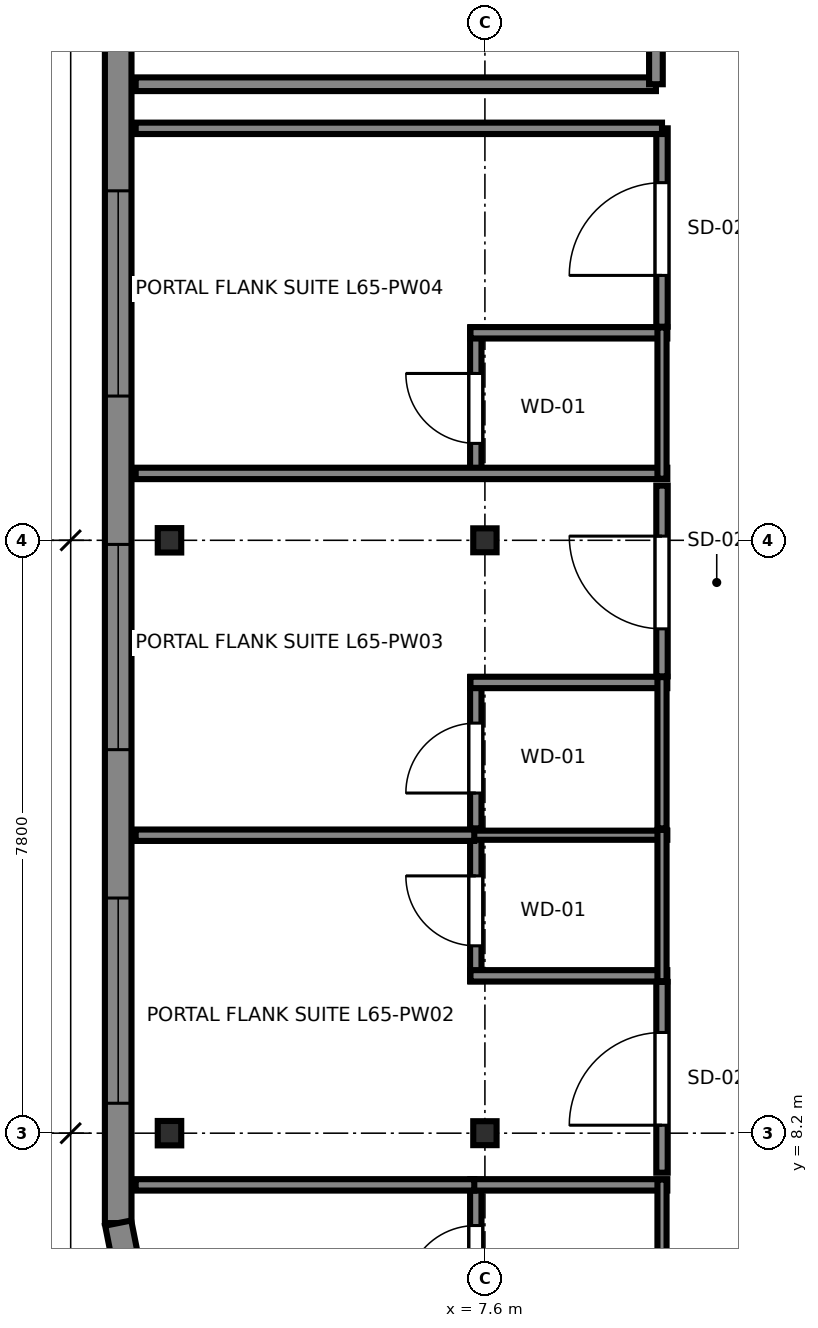
"""IFC4 building model, lengths in metres.
Left out: names, types, materials, properties, quantities, classifications, styles, units other than length and angle.
Written with IfcOpenShell. Run it as: python <this file> out.ifc"""

import sys

from ifc_helpers import new_model, si_unit, direction, frame, frame_2d, origin, origin_2d, place, context, subcontext, project, spatial, rectangle, i_section, extrude, source, transform, mapped, element, fill, save


model = new_model("IFC4")
c1 = context("Model", 3, precision=1e-05, world=origin(), true_north=direction((0.0, 1.0)))
c2 = subcontext(c1, "Body", "Model", "MODEL_VIEW")
j1 = project(units=[si_unit("LENGTHUNIT", "METRE"), si_unit("PLANEANGLEUNIT", "RADIAN")], contexts=[c1])
p1 = place(None, origin())
s1 = spatial("IfcSite", under=j1, at=p1, CompositionType="ELEMENT")
p2 = place(p1, origin())
s2 = spatial("IfcBuilding", under=s1, at=p2, CompositionType="ELEMENT")
p3 = place(p2, frame((0.0, 0.0, 245.2)))
s3 = spatial("IfcBuildingStorey", under=s2, at=p3, CompositionType="ELEMENT", Elevation=245.2)
m1 = source(origin(), c2, "Body", "SweptSolid", [
    extrude(i_section(OverallWidth=0.309, OverallDepth=0.321, WebThickness=0.014, FlangeThickness=0.022, FilletRadius=0.017, at=origin_2d()), origin(), (0.0, 0.0, 1.0), 3.55),
])
for number, where, z_axis, x_axis in (
    (1, (3.45, 8.2, 0.0), (0.0, 0.0, 1.0), (1.0, 0.0, 0.0)),
    (2, (3.45, 16.0, 0.0), (0.0, 0.0, 1.0), (1.0, 0.0, 0.0)),
):
    element("IfcColumn", number, at=place(p3, frame(where, z_axis=z_axis, x_axis=x_axis)), inside=s3, PredefinedType="COLUMN", context=c2, shape_type="MappedRepresentation", body=[
        mapped(m1, transform((0.0, 0.0, 0.0), x_axis=(1.0, 0.0, 0.0), y_axis=(0.0, 1.0, 0.0), z_axis=(0.0, 0.0, 1.0), scale=1.0)),
    ])
m2 = source(origin(), c2, "Body", "SweptSolid", [
    extrude(i_section(OverallWidth=0.307, OverallDepth=0.315, WebThickness=0.012, FlangeThickness=0.019, FilletRadius=0.017, at=origin_2d()), origin(), (0.0, 0.0, 1.0), 3.55),
])
for number, where, z_axis, x_axis in (
    (3, (7.6, 8.2, 0.0), (0.0, 0.0, 1.0), (1.0, 0.0, 0.0)),
    (4, (7.6, 16.0, 0.0), (0.0, 0.0, 1.0), (1.0, 0.0, 0.0)),
):
    element("IfcColumn", number, at=place(p3, frame(where, z_axis=z_axis, x_axis=x_axis)), inside=s3, PredefinedType="COLUMN", context=c2, shape_type="MappedRepresentation", body=[
        mapped(m2, transform((0.0, 0.0, 0.0), x_axis=(1.0, 0.0, 0.0), y_axis=(0.0, 1.0, 0.0), z_axis=(0.0, 0.0, 1.0), scale=1.0)),
    ])
p4 = place(p3, frame((2.775, 40.783, 0.0), z_axis=(0.0, 0.0, 1.0), x_axis=(0.0, -1.0, 0.0)))
e5 = element("IfcWall", 5, at=p4, inside=s3, PredefinedType="SOLIDWALL", context=c2, shape_type="SweptSolid", body=[
    extrude(rectangle(XDim=33.766, YDim=0.35, at=frame_2d((16.883, 0.0))), origin(), (0.0, 0.0, 1.0), 3.37),
])
p5 = place(p4, frame((1.576, 0.0, 0.68)))
e6 = element("IfcOpeningElement", 6, at=p5, cuts=e5, PredefinedType="OPENING", context=c2, shape_type="SweptSolid", body=[
    extrude(rectangle(XDim=2.7, YDim=1.95, at=frame_2d((1.35, 0.975))), frame((0.0, 0.185, 0.0), z_axis=(0.0, -1.0, 0.0), x_axis=(1.0, 0.0, 0.0)), (0.0, 0.0, 1.0), 0.37),
])
p6 = place(p4, frame((6.228, 0.0, 0.68)))
e7 = element("IfcOpeningElement", 7, at=p6, cuts=e5, PredefinedType="OPENING", context=c2, shape_type="SweptSolid", body=[
    extrude(rectangle(XDim=2.7, YDim=1.95, at=frame_2d((1.35, 0.975))), frame((0.0, 0.185, 0.0), z_axis=(0.0, -1.0, 0.0), x_axis=(1.0, 0.0, 0.0)), (0.0, 0.0, 1.0), 0.37),
])
p7 = place(p4, frame((11.431, 0.0, 0.68)))
e8 = element("IfcOpeningElement", 8, at=p7, cuts=e5, PredefinedType="OPENING", context=c2, shape_type="SweptSolid", body=[
    extrude(rectangle(XDim=2.7, YDim=1.95, at=frame_2d((1.35, 0.975))), frame((0.0, 0.185, 0.0), z_axis=(0.0, -1.0, 0.0), x_axis=(1.0, 0.0, 0.0)), (0.0, 0.0, 1.0), 0.37),
])
p8 = place(p4, frame((15.533, 0.0, 0.68)))
e9 = element("IfcOpeningElement", 9, at=p8, cuts=e5, PredefinedType="OPENING", context=c2, shape_type="SweptSolid", body=[
    extrude(rectangle(XDim=2.7, YDim=1.95, at=frame_2d((1.35, 0.975))), frame((0.0, 0.185, 0.0), z_axis=(0.0, -1.0, 0.0), x_axis=(1.0, 0.0, 0.0)), (0.0, 0.0, 1.0), 0.37),
])
p9 = place(p4, frame((20.185, 0.0, 0.68)))
e10 = element("IfcOpeningElement", 10, at=p9, cuts=e5, PredefinedType="OPENING", context=c2, shape_type="SweptSolid", body=[
    extrude(rectangle(XDim=2.7, YDim=1.95, at=frame_2d((1.35, 0.975))), frame((0.0, 0.185, 0.0), z_axis=(0.0, -1.0, 0.0), x_axis=(1.0, 0.0, 0.0)), (0.0, 0.0, 1.0), 0.37),
])
p10 = place(p4, frame((24.837, 0.0, 0.68)))
e11 = element("IfcOpeningElement", 11, at=p10, cuts=e5, PredefinedType="OPENING", context=c2, shape_type="SweptSolid", body=[
    extrude(rectangle(XDim=2.7, YDim=1.95, at=frame_2d((1.35, 0.975))), frame((0.0, 0.185, 0.0), z_axis=(0.0, -1.0, 0.0), x_axis=(1.0, 0.0, 0.0)), (0.0, 0.0, 1.0), 0.37),
])
p11 = place(p4, frame((29.489, 0.0, 0.68)))
e12 = element("IfcOpeningElement", 12, at=p11, cuts=e5, PredefinedType="OPENING", context=c2, shape_type="SweptSolid", body=[
    extrude(rectangle(XDim=2.7, YDim=1.95, at=frame_2d((1.35, 0.975))), frame((0.0, 0.185, 0.0), z_axis=(0.0, -1.0, 0.0), x_axis=(1.0, 0.0, 0.0)), (0.0, 0.0, 1.0), 0.37),
])
p12 = place(p3, frame((2.775, 7.017, 0.0), z_axis=(0.0, 0.0, 1.0), x_axis=(0.195072403631, -0.980788844421, 0.0)))
e13 = element("IfcWall", 13, at=p12, inside=s3, PredefinedType="SOLIDWALL", context=c2, shape_type="SweptSolid", body=[
    extrude(rectangle(XDim=1.665, YDim=0.35, at=frame_2d((0.832, 0.0))), origin(), (0.0, 0.0, 1.0), 3.37),
])
p13 = place(p3, frame((7.48, 5.6, 0.0), z_axis=(0.0, 0.0, 1.0), x_axis=(0.0, 1.0, 0.0)))
e14 = element("IfcWall", 14, at=p13, inside=s3, PredefinedType="PARTITIONING", context=c2, shape_type="SweptSolid", body=[
    extrude(rectangle(XDim=1.99, YDim=0.15, at=frame_2d((0.995, 0.0))), origin(), (0.0, 0.0, 1.0), 2.827),
])
p14 = place(p13, frame((0.465, 0.0, 0.0)))
e15 = element("IfcOpeningElement", 15, at=p14, cuts=e14, PredefinedType="OPENING", context=c2, shape_type="SweptSolid", body=[
    extrude(rectangle(XDim=0.92, YDim=2.01, at=frame_2d((0.46, 1.005))), frame((0.0, 0.085, 0.0), z_axis=(0.0, -1.0, 0.0), x_axis=(1.0, 0.0, 0.0)), (0.0, 0.0, 1.0), 0.17),
])
p15 = place(p3, frame((7.41, 7.52, 0.0), z_axis=(0.0, 0.0, 1.0), x_axis=(1.0, 0.0, 0.0)))
e16 = element("IfcWall", 16, at=p15, inside=s3, PredefinedType="PARTITIONING", context=c2, shape_type="SweptSolid", body=[
    extrude(rectangle(XDim=2.59, YDim=0.15, at=frame_2d((1.295, 0.0))), origin(), (0.0, 0.0, 1.0), 3.37),
])
p16 = place(p3, frame((9.93, 5.6, 0.0), z_axis=(0.0, 0.0, 1.0), x_axis=(0.0, 1.0, 0.0)))
e17 = element("IfcWall", 17, at=p16, inside=s3, PredefinedType="PLUMBINGWALL", context=c2, shape_type="SweptSolid", body=[
    extrude(rectangle(XDim=1.99, YDim=0.12, at=frame_2d((0.995, 0.0))), origin(), (0.0, 0.0, 1.0), 3.37),
])
p17 = place(p3, frame((7.48, 10.2, 0.0), z_axis=(0.0, 0.0, 1.0), x_axis=(0.0, 1.0, 0.0)))
e18 = element("IfcWall", 18, at=p17, inside=s3, PredefinedType="PARTITIONING", context=c2, shape_type="SweptSolid", body=[
    extrude(rectangle(XDim=1.99, YDim=0.15, at=frame_2d((0.995, 0.0))), origin(), (0.0, 0.0, 1.0), 2.827),
])
p18 = place(p17, frame((0.465, 0.0, 0.0)))
e19 = element("IfcOpeningElement", 19, at=p18, cuts=e18, PredefinedType="OPENING", context=c2, shape_type="SweptSolid", body=[
    extrude(rectangle(XDim=0.92, YDim=2.01, at=frame_2d((0.46, 1.005))), frame((0.0, 0.085, 0.0), z_axis=(0.0, -1.0, 0.0), x_axis=(1.0, 0.0, 0.0)), (0.0, 0.0, 1.0), 0.17),
])
p19 = place(p3, frame((7.41, 10.27, 0.0), z_axis=(0.0, 0.0, 1.0), x_axis=(1.0, 0.0, 0.0)))
e20 = element("IfcWall", 20, at=p19, inside=s3, PredefinedType="PARTITIONING", context=c2, shape_type="SweptSolid", body=[
    extrude(rectangle(XDim=2.59, YDim=0.15, at=frame_2d((1.295, 0.0))), origin(), (0.0, 0.0, 1.0), 3.37),
])
p20 = place(p3, frame((7.41, 12.12, 0.0), z_axis=(0.0, 0.0, 1.0), x_axis=(1.0, 0.0, 0.0)))
e21 = element("IfcWall", 21, at=p20, inside=s3, PredefinedType="PLUMBINGWALL", context=c2, shape_type="SweptSolid", body=[
    extrude(rectangle(XDim=2.59, YDim=0.12, at=frame_2d((1.295, 0.0))), origin(), (0.0, 0.0, 1.0), 3.37),
])
p21 = place(p3, frame((9.93, 10.2, 0.0), z_axis=(0.0, 0.0, 1.0), x_axis=(0.0, 1.0, 0.0)))
e22 = element("IfcWall", 22, at=p21, inside=s3, PredefinedType="PLUMBINGWALL", context=c2, shape_type="SweptSolid", body=[
    extrude(rectangle(XDim=1.99, YDim=0.12, at=frame_2d((0.995, 0.0))), origin(), (0.0, 0.0, 1.0), 3.37),
])
p22 = place(p3, frame((7.48, 12.21, 0.0), z_axis=(0.0, 0.0, 1.0), x_axis=(0.0, 1.0, 0.0)))
e23 = element("IfcWall", 23, at=p22, inside=s3, PredefinedType="PARTITIONING", context=c2, shape_type="SweptSolid", body=[
    extrude(rectangle(XDim=1.99, YDim=0.15, at=frame_2d((0.995, 0.0))), origin(), (0.0, 0.0, 1.0), 2.827),
])
p23 = place(p22, frame((0.465, 0.0, 0.0)))
e24 = element("IfcOpeningElement", 24, at=p23, cuts=e23, PredefinedType="OPENING", context=c2, shape_type="SweptSolid", body=[
    extrude(rectangle(XDim=0.92, YDim=2.01, at=frame_2d((0.46, 1.005))), frame((0.0, 0.085, 0.0), z_axis=(0.0, -1.0, 0.0), x_axis=(1.0, 0.0, 0.0)), (0.0, 0.0, 1.0), 0.17),
])
p24 = place(p3, frame((7.41, 14.13, 0.0), z_axis=(0.0, 0.0, 1.0), x_axis=(1.0, 0.0, 0.0)))
e25 = element("IfcWall", 25, at=p24, inside=s3, PredefinedType="PARTITIONING", context=c2, shape_type="SweptSolid", body=[
    extrude(rectangle(XDim=2.59, YDim=0.15, at=frame_2d((1.295, 0.0))), origin(), (0.0, 0.0, 1.0), 3.37),
])
p25 = place(p3, frame((9.93, 12.21, 0.0), z_axis=(0.0, 0.0, 1.0), x_axis=(0.0, 1.0, 0.0)))
e26 = element("IfcWall", 26, at=p25, inside=s3, PredefinedType="PLUMBINGWALL", context=c2, shape_type="SweptSolid", body=[
    extrude(rectangle(XDim=1.99, YDim=0.12, at=frame_2d((0.995, 0.0))), origin(), (0.0, 0.0, 1.0), 3.37),
])
p26 = place(p3, frame((7.48, 16.81, 0.0), z_axis=(0.0, 0.0, 1.0), x_axis=(0.0, 1.0, 0.0)))
e27 = element("IfcWall", 27, at=p26, inside=s3, PredefinedType="PARTITIONING", context=c2, shape_type="SweptSolid", body=[
    extrude(rectangle(XDim=1.99, YDim=0.15, at=frame_2d((0.995, 0.0))), origin(), (0.0, 0.0, 1.0), 2.827),
])
p27 = place(p26, frame((0.465, 0.0, 0.0)))
e28 = element("IfcOpeningElement", 28, at=p27, cuts=e27, PredefinedType="OPENING", context=c2, shape_type="SweptSolid", body=[
    extrude(rectangle(XDim=0.92, YDim=2.01, at=frame_2d((0.46, 1.005))), frame((0.0, 0.085, 0.0), z_axis=(0.0, -1.0, 0.0), x_axis=(1.0, 0.0, 0.0)), (0.0, 0.0, 1.0), 0.17),
])
p28 = place(p3, frame((3.005, 16.88, 0.0), z_axis=(0.0, 0.0, 1.0), x_axis=(1.0, 0.0, 0.0)))
e29 = element("IfcWall", 29, at=p28, inside=s3, PredefinedType="PARTITIONING", context=c2, shape_type="SweptSolid", body=[
    extrude(rectangle(XDim=6.995, YDim=0.15, at=frame_2d((3.498, 0.0))), origin(), (0.0, 0.0, 1.0), 3.37),
])
p29 = place(p3, frame((7.41, 18.73, 0.0), z_axis=(0.0, 0.0, 1.0), x_axis=(1.0, 0.0, 0.0)))
e30 = element("IfcWall", 30, at=p29, inside=s3, PredefinedType="PARTITIONING", context=c2, shape_type="SweptSolid", body=[
    extrude(rectangle(XDim=2.59, YDim=0.15, at=frame_2d((1.295, 0.0))), origin(), (0.0, 0.0, 1.0), 3.37),
])
p30 = place(p3, frame((9.93, 16.81, 0.0), z_axis=(0.0, 0.0, 1.0), x_axis=(0.0, 1.0, 0.0)))
e31 = element("IfcWall", 31, at=p30, inside=s3, PredefinedType="PLUMBINGWALL", context=c2, shape_type="SweptSolid", body=[
    extrude(rectangle(XDim=1.99, YDim=0.12, at=frame_2d((0.995, 0.0))), origin(), (0.0, 0.0, 1.0), 3.37),
])
p31 = place(p3, frame((3.005, 7.52, 0.0), z_axis=(0.0, 0.0, 1.0), x_axis=(1.0, 0.0, 0.0)))
e32 = element("IfcWall", 32, at=p31, inside=s3, PredefinedType="PARTITIONING", context=c2, shape_type="SweptSolid", body=[
    extrude(rectangle(XDim=4.455, YDim=0.15, at=frame_2d((2.228, 0.0))), origin(), (0.0, 0.0, 1.0), 3.37),
])
p32 = place(p3, frame((9.93, 7.68, 0.0), z_axis=(0.0, 0.0, 1.0), x_axis=(0.0, 1.0, 0.0)))
e33 = element("IfcWall", 33, at=p32, inside=s3, PredefinedType="PARTITIONING", context=c2, shape_type="SweptSolid", body=[
    extrude(rectangle(XDim=2.51, YDim=0.15, at=frame_2d((1.255, 0.0))), origin(), (0.0, 0.0, 1.0), 3.37),
])
p33 = place(p32, frame((0.625, 0.0, 0.0)))
e34 = element("IfcOpeningElement", 34, at=p33, cuts=e33, PredefinedType="OPENING", context=c2, shape_type="SweptSolid", body=[
    extrude(rectangle(XDim=1.22, YDim=2.08, at=frame_2d((0.61, 1.04))), frame((0.0, 0.085, 0.0), z_axis=(0.0, -1.0, 0.0), x_axis=(1.0, 0.0, 0.0)), (0.0, 0.0, 1.0), 0.17),
])
p34 = place(p3, frame((3.005, 12.12, 0.0), z_axis=(0.0, 0.0, 1.0), x_axis=(1.0, 0.0, 0.0)))
e35 = element("IfcWall", 35, at=p34, inside=s3, PredefinedType="PARTITIONING", context=c2, shape_type="SweptSolid", body=[
    extrude(rectangle(XDim=4.455, YDim=0.15, at=frame_2d((2.228, 0.0))), origin(), (0.0, 0.0, 1.0), 3.37),
])
p35 = place(p3, frame((9.93, 14.21, 0.0), z_axis=(0.0, 0.0, 1.0), x_axis=(0.0, 1.0, 0.0)))
e36 = element("IfcWall", 36, at=p35, inside=s3, PredefinedType="PARTITIONING", context=c2, shape_type="SweptSolid", body=[
    extrude(rectangle(XDim=2.51, YDim=0.15, at=frame_2d((1.255, 0.0))), origin(), (0.0, 0.0, 1.0), 3.37),
])
p36 = place(p35, frame((0.625, 0.0, 0.0)))
e37 = element("IfcOpeningElement", 37, at=p36, cuts=e36, PredefinedType="OPENING", context=c2, shape_type="SweptSolid", body=[
    extrude(rectangle(XDim=1.22, YDim=2.08, at=frame_2d((0.61, 1.04))), frame((0.0, 0.085, 0.0), z_axis=(0.0, -1.0, 0.0), x_axis=(1.0, 0.0, 0.0)), (0.0, 0.0, 1.0), 0.17),
])
p37 = place(p3, frame((9.93, 18.81, 0.0), z_axis=(0.0, 0.0, 1.0), x_axis=(0.0, 1.0, 0.0)))
e38 = element("IfcWall", 38, at=p37, inside=s3, PredefinedType="PARTITIONING", context=c2, shape_type="SweptSolid", body=[
    extrude(rectangle(XDim=2.61, YDim=0.15, at=frame_2d((1.305, 0.0))), origin(), (0.0, 0.0, 1.0), 3.37),
])
p38 = place(p37, frame((0.675, 0.0, 0.0)))
e39 = element("IfcOpeningElement", 39, at=p38, cuts=e38, PredefinedType="OPENING", context=c2, shape_type="SweptSolid", body=[
    extrude(rectangle(XDim=1.22, YDim=2.08, at=frame_2d((0.61, 1.04))), frame((0.0, 0.085, 0.0), z_axis=(0.0, -1.0, 0.0), x_axis=(1.0, 0.0, 0.0)), (0.0, 0.0, 1.0), 0.17),
])
p39 = place(p3, frame((3.005, 21.42, 0.0), z_axis=(0.0, 0.0, 1.0), x_axis=(1.0, 0.0, 0.0)))
e40 = element("IfcWall", 40, at=p39, inside=s3, PredefinedType="PARTITIONING", context=c2, shape_type="SweptSolid", body=[
    extrude(rectangle(XDim=6.925, YDim=0.15, at=frame_2d((3.462, 0.0))), origin(), (0.0, 0.0, 1.0), 3.37),
])
p40 = place(p3, frame((3.005, 22.0, 0.0), z_axis=(0.0, 0.0, 1.0), x_axis=(1.0, 0.0, 0.0)))
e41 = element("IfcWall", 41, at=p40, inside=s3, PredefinedType="PARTITIONING", context=c2, shape_type="SweptSolid", body=[
    extrude(rectangle(XDim=6.845, YDim=0.18, at=frame_2d((3.423, 0.0))), origin(), (0.0, 0.0, 1.0), 3.37),
])
p41 = place(p3, frame((9.85, 22.0, 0.0), z_axis=(0.0, 0.0, 1.0), x_axis=(0.0, 1.0, 0.0)))
e42 = element("IfcWall", 42, at=p41, inside=s3, PredefinedType="PARTITIONING", context=c2, shape_type="SweptSolid", body=[
    extrude(rectangle(XDim=4.3, YDim=0.18, at=frame_2d((2.15, 0.0))), origin(), (0.0, 0.0, 1.0), 3.37),
])
p42 = place(p41, frame((1.325, 0.0, 0.0)))
e43 = element("IfcOpeningElement", 43, at=p42, cuts=e42, PredefinedType="OPENING", context=c2, shape_type="SweptSolid", body=[
    extrude(rectangle(XDim=1.65, YDim=2.15, at=frame_2d((0.825, 1.075))), frame((0.0, 0.1, 0.0), z_axis=(0.0, -1.0, 0.0), x_axis=(1.0, 0.0, 0.0)), (0.0, 0.0, 1.0), 0.2),
])
m3 = source(origin(), c2, "Body", "SweptSolid", [
    extrude(rectangle(XDim=2.7, YDim=1.95, at=frame_2d((1.35, 0.975))), frame((0.0, 0.09, 0.0), z_axis=(0.0, -1.0, 0.0), x_axis=(1.0, 0.0, 0.0)), (0.0, 0.0, 1.0), 0.06),
])
p43 = place(p9, origin())
e44 = element("IfcWindow", 44, at=p43, inside=s3, PartitioningType="TRIPLE_PANEL_HORIZONTAL", PredefinedType="WINDOW", context=c2, shape_type="MappedRepresentation", body=[
    mapped(m3, transform((0.0, 0.0, 0.0), x_axis=(1.0, 0.0, 0.0), y_axis=(0.0, 1.0, 0.0), z_axis=(0.0, 0.0, 1.0), scale=1.0)),
])
fill(e10, e44)
p44 = place(p10, origin())
e45 = element("IfcWindow", 45, at=p44, inside=s3, PartitioningType="TRIPLE_PANEL_HORIZONTAL", PredefinedType="WINDOW", context=c2, shape_type="MappedRepresentation", body=[
    mapped(m3, transform((0.0, 0.0, 0.0), x_axis=(1.0, 0.0, 0.0), y_axis=(0.0, 1.0, 0.0), z_axis=(0.0, 0.0, 1.0), scale=1.0)),
])
fill(e11, e45)
p45 = place(p11, origin())
e46 = element("IfcWindow", 46, at=p45, inside=s3, PartitioningType="TRIPLE_PANEL_HORIZONTAL", PredefinedType="WINDOW", context=c2, shape_type="MappedRepresentation", body=[
    mapped(m3, transform((0.0, 0.0, 0.0), x_axis=(1.0, 0.0, 0.0), y_axis=(0.0, 1.0, 0.0), z_axis=(0.0, 0.0, 1.0), scale=1.0)),
])
fill(e12, e46)
m4 = source(origin(), c2, "Body", "SweptSolid", [
    extrude(rectangle(XDim=0.92, YDim=2.01, at=frame_2d((0.46, 1.005))), frame((0.0, 0.025, 0.0), z_axis=(0.0, -1.0, 0.0), x_axis=(1.0, 0.0, 0.0)), (0.0, 0.0, 1.0), 0.05),
])
p46 = place(p14, origin())
e47 = element("IfcDoor", 47, at=p46, inside=s3, OperationType="SINGLE_SWING_LEFT", PredefinedType="DOOR", context=c2, shape_type="MappedRepresentation", body=[
    mapped(m4, transform((0.0, 0.0, 0.0), x_axis=(1.0, 0.0, 0.0), y_axis=(0.0, 1.0, 0.0), z_axis=(0.0, 0.0, 1.0), scale=1.0)),
])
fill(e15, e47)
p47 = place(p18, origin())
e48 = element("IfcDoor", 48, at=p47, inside=s3, OperationType="SINGLE_SWING_RIGHT", PredefinedType="DOOR", context=c2, shape_type="MappedRepresentation", body=[
    mapped(m4, transform((0.0, 0.0, 0.0), x_axis=(1.0, 0.0, 0.0), y_axis=(0.0, 1.0, 0.0), z_axis=(0.0, 0.0, 1.0), scale=1.0)),
])
fill(e19, e48)
p48 = place(p23, origin())
e49 = element("IfcDoor", 49, at=p48, inside=s3, OperationType="SINGLE_SWING_LEFT", PredefinedType="DOOR", context=c2, shape_type="MappedRepresentation", body=[
    mapped(m4, transform((0.0, 0.0, 0.0), x_axis=(1.0, 0.0, 0.0), y_axis=(0.0, 1.0, 0.0), z_axis=(0.0, 0.0, 1.0), scale=1.0)),
])
fill(e24, e49)
p49 = place(p27, origin())
e50 = element("IfcDoor", 50, at=p49, inside=s3, OperationType="SINGLE_SWING_RIGHT", PredefinedType="DOOR", context=c2, shape_type="MappedRepresentation", body=[
    mapped(m4, transform((0.0, 0.0, 0.0), x_axis=(1.0, 0.0, 0.0), y_axis=(0.0, 1.0, 0.0), z_axis=(0.0, 0.0, 1.0), scale=1.0)),
])
fill(e28, e50)
m5 = source(origin(), c2, "Body", "SweptSolid", [
    extrude(rectangle(XDim=1.22, YDim=2.08, at=frame_2d((0.61, 1.04))), frame((0.0, 0.025, 0.0), z_axis=(0.0, -1.0, 0.0), x_axis=(1.0, 0.0, 0.0)), (0.0, 0.0, 1.0), 0.05),
])
p50 = place(p33, origin())
e51 = element("IfcDoor", 51, at=p50, inside=s3, OperationType="SINGLE_SWING_LEFT", PredefinedType="DOOR", context=c2, shape_type="MappedRepresentation", body=[
    mapped(m5, transform((0.0, 0.0, 0.0), x_axis=(1.0, 0.0, 0.0), y_axis=(0.0, 1.0, 0.0), z_axis=(0.0, 0.0, 1.0), scale=1.0)),
])
fill(e34, e51)
p51 = place(p36, origin())
e52 = element("IfcDoor", 52, at=p51, inside=s3, OperationType="SINGLE_SWING_RIGHT", PredefinedType="DOOR", context=c2, shape_type="MappedRepresentation", body=[
    mapped(m5, transform((0.0, 0.0, 0.0), x_axis=(1.0, 0.0, 0.0), y_axis=(0.0, 1.0, 0.0), z_axis=(0.0, 0.0, 1.0), scale=1.0)),
])
fill(e37, e52)
p52 = place(p38, origin())
e53 = element("IfcDoor", 53, at=p52, inside=s3, OperationType="SINGLE_SWING_LEFT", PredefinedType="DOOR", context=c2, shape_type="MappedRepresentation", body=[
    mapped(m5, transform((0.0, 0.0, 0.0), x_axis=(1.0, 0.0, 0.0), y_axis=(0.0, 1.0, 0.0), z_axis=(0.0, 0.0, 1.0), scale=1.0)),
])
fill(e39, e53)
save(model, sys.argv[1])
